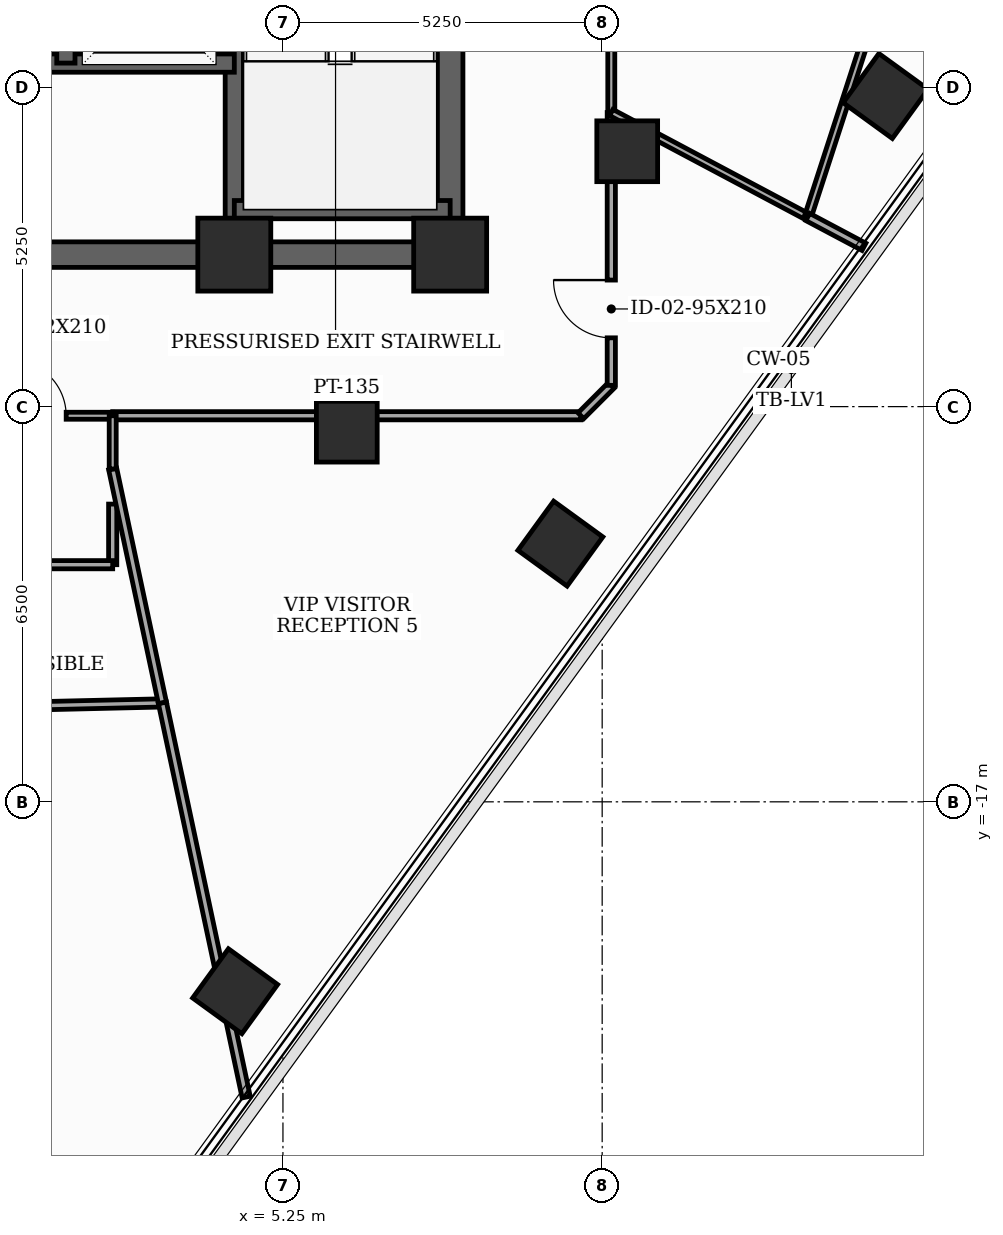
"""IFC4 building model, lengths in metres.
Left out: names, types, materials, properties, quantities, classifications, styles, units other than length and angle.
Written with IfcOpenShell. Run it as: python <this file> out.ifc"""

import sys

from ifc_helpers import new_model, si_unit, direction, frame, frame_2d, origin, origin_2d, place, context, subcontext, project, spatial, rectangle, extrude, element, fill, save


model = new_model("IFC4")
c1 = context("Model", 3, precision=1e-05, world=origin(), true_north=direction((0.0, 1.0)))
c2 = subcontext(c1, "Body", "Model", "MODEL_VIEW")
j1 = project(units=[si_unit("LENGTHUNIT", "METRE"), si_unit("PLANEANGLEUNIT", "RADIAN")], contexts=[c1])
p1 = place(None, origin())
s1 = spatial("IfcSite", under=j1, at=p1, CompositionType="ELEMENT")
p2 = place(p1, origin())
s2 = spatial("IfcBuilding", under=s1, at=p2, CompositionType="ELEMENT")
p3 = place(p2, frame((0.0, 0.0, 222.6)))
s3 = spatial("IfcBuildingStorey", under=s2, at=p3, CompositionType="ELEMENT", Elevation=222.6)
for number, where, z_axis, x_axis in (
    (1, (4.45, -8.0, 0.0), (0.0, 0.0, 1.0), (1.0, 0.0, 0.0)),
    (2, (8.0, -8.0, 0.0), (0.0, 0.0, 1.0), (1.0, 0.0, 0.0)),
):
    element("IfcColumn", number, at=place(p3, frame(where, z_axis=z_axis, x_axis=x_axis)), inside=s3, PredefinedType="COLUMN", context=c2, shape_type="SweptSolid", body=[
        extrude(rectangle(XDim=1.2, YDim=1.2, at=origin_2d()), origin(), (0.0, 0.0, 1.0), 3.7),
    ])
for number, where, z_axis, x_axis in (
    (3, (6.3, -10.912, 0.0), (0.0, 0.0, 1.0), (1.0, 0.0, 0.0)),
    (4, (10.912, -6.3, 0.0), (0.0, 0.0, 1.0), (1.0, 0.0, 0.0)),
    (5, (4.464, -20.115, 0.0), (0.0, 0.0, 1.0), (0.588, 0.809, 0.0)),
    (6, (9.812, -12.753, 0.0), (0.0, 0.0, 1.0), (0.588, 0.809, 0.0)),
    (7, (15.161, -5.391, 0.0), (0.0, 0.0, 1.0), (0.588, 0.809, 0.0)),
):
    element("IfcColumn", number, at=place(p3, frame(where, z_axis=z_axis, x_axis=x_axis)), inside=s3, PredefinedType="COLUMN", context=c2, shape_type="SweptSolid", body=[
        extrude(rectangle(XDim=1.0, YDim=1.0, at=origin_2d()), origin(), (0.0, 0.0, 1.0), 3.7),
    ])
p4 = place(p3, frame((8.0, -8.0, 0.0), z_axis=(0.0, 0.0, 1.0), x_axis=(0.0, 1.0, 0.0)))
e8 = element("IfcWall", 8, at=p4, inside=s3, PredefinedType="SHEAR", context=c2, shape_type="SweptSolid", body=[
    extrude(rectangle(XDim=16.0, YDim=0.42, at=frame_2d((8.0, 0.0))), origin(), (0.0, 0.0, 1.0), 3.5),
])
p5 = place(p4, frame((9.6, 0.0, 0.0)))
e9 = element("IfcOpeningElement", 9, at=p5, cuts=e8, PredefinedType="OPENING", context=c2, shape_type="SweptSolid", body=[
    extrude(rectangle(XDim=1.05, YDim=2.15, at=frame_2d((0.525, 1.075))), frame((0.0, 0.22, 0.0), z_axis=(0.0, -1.0, 0.0), x_axis=(1.0, 0.0, 0.0)), (0.0, 0.0, 1.0), 0.44),
])
p6 = place(p4, frame((14.389, 0.0, 0.0)))
e10 = element("IfcOpeningElement", 10, at=p6, cuts=e8, PredefinedType="OPENING", context=c2, shape_type="SweptSolid", body=[
    extrude(rectangle(XDim=0.85, YDim=2.02, at=frame_2d((0.425, 1.01))), frame((0.0, 0.22, 0.0), z_axis=(0.0, -1.0, 0.0), x_axis=(1.0, 0.0, 0.0)), (0.0, 0.0, 1.0), 0.44),
])
p7 = place(p3, frame((-8.0, -8.0, 0.0), z_axis=(0.0, 0.0, 1.0), x_axis=(1.0, 0.0, 0.0)))
e11 = element("IfcWall", 11, at=p7, inside=s3, PredefinedType="SHEAR", context=c2, shape_type="SweptSolid", body=[
    extrude(rectangle(XDim=16.0, YDim=0.42, at=frame_2d((8.0, 0.0))), origin(), (0.0, 0.0, 1.0), 3.5),
])
p8 = place(p7, frame((7.52, 0.0, 0.0)))
e12 = element("IfcOpeningElement", 12, at=p8, cuts=e11, PredefinedType="OPENING", context=c2, shape_type="SweptSolid", body=[
    extrude(rectangle(XDim=0.95, YDim=2.1, at=frame_2d((0.475, 1.05))), frame((0.0, 0.22, 0.0), z_axis=(0.0, -1.0, 0.0), x_axis=(1.0, 0.0, 0.0)), (0.0, 0.0, 1.0), 0.44),
])
p9 = place(p3, frame((4.45, -7.79, 0.0), z_axis=(0.0, 0.0, 1.0), x_axis=(0.0, 1.0, 0.0)))
e13 = element("IfcWall", 13, at=p9, inside=s3, PredefinedType="SHEAR", context=c2, shape_type="SweptSolid", body=[
    extrude(rectangle(XDim=15.58, YDim=0.3, at=frame_2d((7.79, 0.0))), origin(), (0.0, 0.0, 1.0), 3.5),
])
p10 = place(p3, frame((4.45, -7.26, 0.0), z_axis=(0.0, 0.0, 1.0), x_axis=(1.0, 0.0, 0.0)))
e14 = element("IfcWall", 14, at=p10, inside=s3, PredefinedType="SHEAR", context=c2, shape_type="SweptSolid", body=[
    extrude(rectangle(XDim=3.55, YDim=0.3, at=frame_2d((1.775, 0.0))), origin(), (0.0, 0.0, 1.0), 3.5),
])
p11 = place(p3, frame((-4.45, -4.85, 0.0), z_axis=(0.0, 0.0, 1.0), x_axis=(1.0, 0.0, 0.0)))
e15 = element("IfcWall", 15, at=p11, inside=s3, PredefinedType="SHEAR", context=c2, shape_type="SweptSolid", body=[
    extrude(rectangle(XDim=8.9, YDim=0.3, at=frame_2d((4.45, 0.0))), origin(), (0.0, 0.0, 1.0), 3.5),
])
p12 = place(p3, frame((1.68, -4.85, 0.0), z_axis=(0.0, 0.0, 1.0), x_axis=(0.0, 1.0, 0.0)))
e16 = element("IfcWall", 16, at=p12, inside=s3, PredefinedType="SHEAR", context=c2, shape_type="SweptSolid", body=[
    extrude(rectangle(XDim=12.64, YDim=0.3, at=frame_2d((6.32, 0.0))), origin(), (0.0, 0.0, 1.0), 3.5),
])
p13 = place(p12, frame((0.55, 0.0, 0.0)))
e17 = element("IfcOpeningElement", 17, at=p13, cuts=e16, PredefinedType="OPENING", context=c2, shape_type="SweptSolid", body=[
    extrude(rectangle(XDim=1.1, YDim=2.1, at=frame_2d((0.55, 1.05))), frame((0.0, 0.16, 0.0), z_axis=(0.0, -1.0, 0.0), x_axis=(1.0, 0.0, 0.0)), (0.0, 0.0, 1.0), 0.32),
])
p14 = place(p12, frame((2.65, 0.0, 0.0)))
e18 = element("IfcOpeningElement", 18, at=p14, cuts=e16, PredefinedType="OPENING", context=c2, shape_type="SweptSolid", body=[
    extrude(rectangle(XDim=1.1, YDim=2.1, at=frame_2d((0.55, 1.05))), frame((0.0, 0.16, 0.0), z_axis=(0.0, -1.0, 0.0), x_axis=(1.0, 0.0, 0.0)), (0.0, 0.0, 1.0), 0.32),
])
p15 = place(p12, frame((4.75, 0.0, 0.0)))
e19 = element("IfcOpeningElement", 19, at=p15, cuts=e16, PredefinedType="OPENING", context=c2, shape_type="SweptSolid", body=[
    extrude(rectangle(XDim=1.1, YDim=2.1, at=frame_2d((0.55, 1.05))), frame((0.0, 0.16, 0.0), z_axis=(0.0, -1.0, 0.0), x_axis=(1.0, 0.0, 0.0)), (0.0, 0.0, 1.0), 0.32),
])
p16 = place(p12, frame((8.9, 0.0, 0.0)))
e20 = element("IfcOpeningElement", 20, at=p16, cuts=e16, PredefinedType="OPENING", context=c2, shape_type="SweptSolid", body=[
    extrude(rectangle(XDim=0.95, YDim=2.1, at=frame_2d((0.475, 1.05))), frame((0.0, 0.16, 0.0), z_axis=(0.0, -1.0, 0.0), x_axis=(1.0, 0.0, 0.0)), (0.0, 0.0, 1.0), 0.32),
])
p17 = place(p3, frame((10.65, -5.663, 0.0), z_axis=(0.0, 0.0, 1.0), x_axis=(0.0, 1.0, 0.0)))
e21 = element("IfcWall", 21, at=p17, inside=s3, PredefinedType="PARTITIONING", context=c2, shape_type="SweptSolid", body=[
    extrude(rectangle(XDim=7.145, YDim=0.115, at=frame_2d((3.573, 0.0))), origin(), (0.0, 0.0, 1.0), 2.885),
])
p18 = place(p17, frame((3.097, 0.0, 0.0)))
e22 = element("IfcOpeningElement", 22, at=p18, cuts=e21, PredefinedType="OPENING", context=c2, shape_type="SweptSolid", body=[
    extrude(rectangle(XDim=0.95, YDim=2.1, at=frame_2d((0.475, 1.05))), frame((0.0, 0.067, 0.0), z_axis=(0.0, -1.0, 0.0), x_axis=(1.0, 0.0, 0.0)), (0.0, 0.0, 1.0), 0.135),
])
p19 = place(p3, frame((0.0, -10.65, 0.0), z_axis=(0.0, 0.0, 1.0), x_axis=(1.0, 0.0, 0.0)))
e23 = element("IfcWall", 23, at=p19, inside=s3, PredefinedType="PARTITIONING", context=c2, shape_type="SweptSolid", body=[
    extrude(rectangle(XDim=2.45, YDim=0.115, at=frame_2d((1.225, 0.0))), origin(), (0.0, 0.0, 1.0), 3.5),
])
p20 = place(p19, frame((0.765, 0.0, 0.0)))
e24 = element("IfcOpeningElement", 24, at=p20, cuts=e23, PredefinedType="OPENING", context=c2, shape_type="SweptSolid", body=[
    extrude(rectangle(XDim=0.92, YDim=2.1, at=frame_2d((0.46, 1.05))), frame((0.0, 0.067, 0.0), z_axis=(0.0, -1.0, 0.0), x_axis=(1.0, 0.0, 0.0)), (0.0, 0.0, 1.0), 0.135),
])
p21 = place(p3, frame((2.45, -10.65, 0.0), z_axis=(0.0, 0.0, 1.0), x_axis=(1.0, 0.0, 0.0)))
e25 = element("IfcWall", 25, at=p21, inside=s3, PredefinedType="PARTITIONING", context=c2, shape_type="SweptSolid", body=[
    extrude(rectangle(XDim=7.7, YDim=0.135, at=frame_2d((3.85, 0.0))), origin(), (0.0, 0.0, 1.0), 2.885),
])
p22 = place(p3, frame((10.15, -10.65, 0.0), z_axis=(0.0, 0.0, 1.0), x_axis=(0.707106781187, 0.707106781187, 0.0)))
e26 = element("IfcWall", 26, at=p22, inside=s3, PredefinedType="PARTITIONING", context=c2, shape_type="SweptSolid", body=[
    extrude(rectangle(XDim=0.707, YDim=0.135, at=frame_2d((0.354, 0.0))), origin(), (0.0, 0.0, 1.0), 3.5),
])
p23 = place(p3, frame((10.65, -10.15, 0.0), z_axis=(0.0, 0.0, 1.0), x_axis=(0.0, 1.0, 0.0)))
e27 = element("IfcWall", 27, at=p23, inside=s3, PredefinedType="PARTITIONING", context=c2, shape_type="SweptSolid", body=[
    extrude(rectangle(XDim=4.487, YDim=0.135, at=frame_2d((2.243, 0.0))), origin(), (0.0, 0.0, 1.0), 2.885),
])
p24 = place(p23, frame((0.781, 0.0, 0.0)))
e28 = element("IfcOpeningElement", 28, at=p24, cuts=e27, PredefinedType="OPENING", context=c2, shape_type="SweptSolid", body=[
    extrude(rectangle(XDim=0.95, YDim=2.1, at=frame_2d((0.475, 1.05))), frame((0.0, 0.077, 0.0), z_axis=(0.0, -1.0, 0.0), x_axis=(1.0, 0.0, 0.0)), (0.0, 0.0, 1.0), 0.155),
])
p25 = place(p3, frame((10.65, -5.663, 0.0), z_axis=(0.0, 0.0, 1.0), x_axis=(0.882952413676, -0.469462496036, 0.0)))
e29 = element("IfcWall", 29, at=p25, inside=s3, PredefinedType="PARTITIONING", context=c2, shape_type="SweptSolid", body=[
    extrude(rectangle(XDim=3.659, YDim=0.115, at=frame_2d((1.83, 0.0))), origin(), (0.0, 0.0, 1.0), 2.885),
])
p26 = place(p3, frame((13.881, -7.381, 0.0), z_axis=(0.0, 0.0, 1.0), x_axis=(0.309006266506, 0.951060001924, 0.0)))
e30 = element("IfcWall", 30, at=p26, inside=s3, PredefinedType="PARTITIONING", context=c2, shape_type="SweptSolid", body=[
    extrude(rectangle(XDim=5.88, YDim=0.115, at=frame_2d((2.94, 0.0))), origin(), (0.0, 0.0, 1.0), 2.985),
])
p27 = place(p3, frame((-2.97, -15.518, 0.0), z_axis=(0.0, 0.0, 1.0), x_axis=(0.99972988351, 0.023241342836, 0.0)))
e31 = element("IfcWall", 31, at=p27, inside=s3, PredefinedType="PARTITIONING", context=c2, shape_type="SweptSolid", body=[
    extrude(rectangle(XDim=6.24, YDim=0.135, at=frame_2d((3.12, 0.0))), origin(), (0.0, 0.0, 1.0), 2.985),
])
p28 = place(p3, frame((2.45, -12.103, 0.0), z_axis=(0.0, 0.0, 1.0), x_axis=(0.0, -1.0, 0.0)))
e32 = element("IfcWall", 32, at=p28, inside=s3, PredefinedType="PARTITIONING", context=c2, shape_type="SweptSolid", body=[
    extrude(rectangle(XDim=0.997, YDim=0.135, at=frame_2d((0.499, 0.0))), origin(), (0.0, 0.0, 1.0), 2.885),
])
p29 = place(p3, frame((2.45, -13.1, 0.0), z_axis=(0.0, 0.0, 1.0), x_axis=(-1.0, 0.0, 0.0)))
e33 = element("IfcWall", 33, at=p29, inside=s3, PredefinedType="PARTITIONING", context=c2, shape_type="SweptSolid", body=[
    extrude(rectangle(XDim=2.45, YDim=0.135, at=frame_2d((1.225, 0.0))), origin(), (0.0, 0.0, 1.0), 2.985),
])
p30 = place(p3, frame((3.268, -15.373, 0.0), z_axis=(0.0, 0.0, 1.0), x_axis=(-0.208002774368, 0.978128235895, 0.0)))
e34 = element("IfcWall", 34, at=p30, inside=s3, PredefinedType="PARTITIONING", context=c2, shape_type="SweptSolid", body=[
    extrude(rectangle(XDim=3.933, YDim=0.135, at=frame_2d((1.967, 0.0))), origin(), (0.0, 0.0, 1.0), 2.885),
])
p31 = place(p3, frame((4.645, -21.856, 0.0), z_axis=(0.0, 0.0, 1.0), x_axis=(-0.207797956892, 0.978171768715, 0.0)))
e35 = element("IfcWall", 35, at=p31, inside=s3, PredefinedType="PARTITIONING", context=c2, shape_type="SweptSolid", body=[
    extrude(rectangle(XDim=6.628, YDim=0.135, at=frame_2d((3.314, 0.0))), origin(), (0.0, 0.0, 1.0), 2.985),
])
p32 = place(p3, frame((2.45, -11.526, 0.0), z_axis=(0.0, 0.0, 1.0), x_axis=(0.0, 1.0, 0.0)))
e36 = element("IfcWall", 36, at=p32, inside=s3, PredefinedType="PARTITIONING", context=c2, shape_type="SweptSolid", body=[
    extrude(rectangle(XDim=0.876, YDim=0.115, at=frame_2d((0.438, 0.0))), origin(), (0.0, 0.0, 1.0), 3.5),
])
p33 = place(p3, frame((14.805, -7.872, 0.0), z_axis=(0.0, 0.0, 1.0), x_axis=(-0.883242549552, 0.468916409033, 0.0)))
e37 = element("IfcWall", 37, at=p33, inside=s3, PredefinedType="PARTITIONING", context=c2, shape_type="SweptSolid", body=[
    extrude(rectangle(XDim=1.046, YDim=0.135, at=frame_2d((0.523, 0.0))), origin(), (0.0, 0.0, 1.0), 3.035),
])
p34 = place(p20, origin())
e38 = element("IfcDoor", 38, at=p34, inside=s3, OperationType="SINGLE_SWING_LEFT", PredefinedType="DOOR", context=c2, shape_type="SweptSolid", body=[
    extrude(rectangle(XDim=0.92, YDim=2.1, at=frame_2d((0.46, 1.05))), frame((0.0, 0.025, 0.0), z_axis=(0.0, -1.0, 0.0), x_axis=(1.0, 0.0, 0.0)), (0.0, 0.0, 1.0), 0.05),
])
fill(e24, e38)
p35 = place(p24, origin())
e39 = element("IfcDoor", 39, at=p35, inside=s3, OperationType="SINGLE_SWING_RIGHT", PredefinedType="DOOR", context=c2, shape_type="SweptSolid", body=[
    extrude(rectangle(XDim=0.95, YDim=2.1, at=frame_2d((0.475, 1.05))), frame((0.0, 0.025, 0.0), z_axis=(0.0, -1.0, 0.0), x_axis=(1.0, 0.0, 0.0)), (0.0, 0.0, 1.0), 0.05),
])
fill(e28, e39)
save(model, sys.argv[1])
